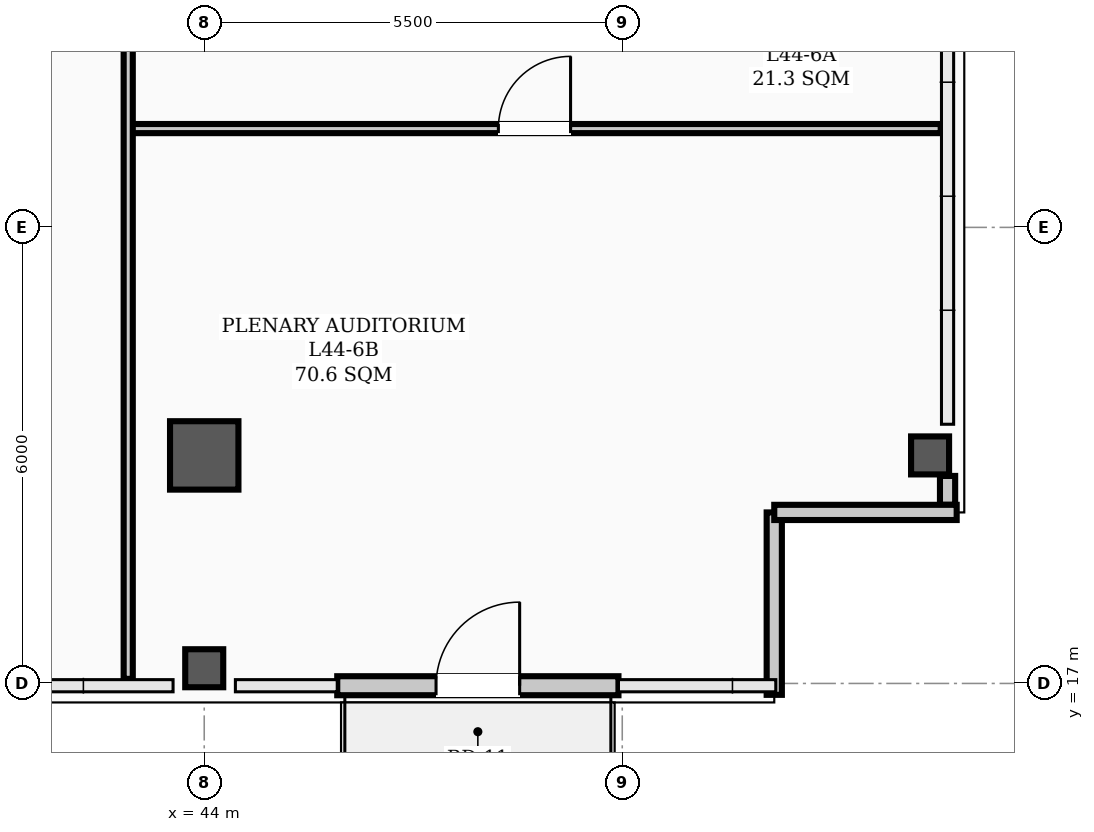
"""IFC4 building model, lengths in metres.
Left out: names, types, materials, properties, quantities, classifications, styles, units other than length and angle.
Written with IfcOpenShell. Run it as: python <this file> out.ifc"""

import sys

from ifc_helpers import new_model, si_unit, direction, frame, frame_2d, origin, origin_2d, place, context, subcontext, project, spatial, rectangle, hollow_rectangle, extrude, element, fill, save


model = new_model("IFC4")
c1 = context("Model", 3, precision=1e-05, world=origin(), true_north=direction((0.0, 1.0)))
c2 = subcontext(c1, "Body", "Model", "MODEL_VIEW")
j1 = project(units=[si_unit("LENGTHUNIT", "METRE"), si_unit("PLANEANGLEUNIT", "RADIAN")], contexts=[c1])
p1 = place(None, origin())
s1 = spatial("IfcSite", under=j1, at=p1, CompositionType="ELEMENT")
p2 = place(p1, origin())
s2 = spatial("IfcBuilding", under=s1, at=p2, CompositionType="ELEMENT")
p3 = place(p2, frame((0.0, 0.0, 177.3)))
s3 = spatial("IfcBuildingStorey", under=s2, at=p3, CompositionType="ELEMENT", Elevation=177.3)
p4 = place(p3, frame((44.0, 20.0, 0.0), z_axis=(0.0, 0.0, 1.0), x_axis=(1.0, 0.0, 0.0)))
e1 = element("IfcColumn", 1, at=p4, inside=s3, PredefinedType="COLUMN", context=c2, shape_type="SweptSolid", body=[
    extrude(hollow_rectangle(XDim=0.9, YDim=0.9, WallThickness=0.035, InnerFilletRadius=0.017, OuterFilletRadius=0.052, at=origin_2d()), origin(), (0.0, 0.0, 1.0), 3.9),
])
for number, where, z_axis, x_axis in (
    (2, (44.0, 17.2, 0.0), (0.0, 0.0, 1.0), (1.0, 0.0, 0.0)),
    (3, (53.55, 20.0, 0.0), (0.0, 0.0, 1.0), (1.0, 0.0, 0.0)),
):
    element("IfcColumn", number, at=place(p3, frame(where, z_axis=z_axis, x_axis=x_axis)), inside=s3, PredefinedType="COLUMN", context=c2, shape_type="SweptSolid", body=[
        extrude(hollow_rectangle(XDim=0.5, YDim=0.5, WallThickness=0.024, InnerFilletRadius=0.012, OuterFilletRadius=0.036, at=origin_2d()), origin(), (0.0, 0.0, 1.0), 3.9),
    ])
p5 = place(p3, frame((53.78, 19.35, 0.0), z_axis=(0.0, 0.0, 1.0), x_axis=(0.0, 1.0, 0.0)))
e4 = element("IfcWall", 4, at=p5, inside=s3, PredefinedType="PARAPET", context=c2, shape_type="SweptSolid", body=[
    extrude(rectangle(XDim=0.38, YDim=0.2, at=frame_2d((0.19, 0.0))), origin(), (0.0, 0.0, 1.0), 1.2),
])
for number, where, z_axis, x_axis in (
    (5, (51.5, 16.85, 0.0), (0.0, 0.0, 1.0), (0.0, 1.0, 0.0)),
    (6, (51.5, 19.25, 0.0), (0.0, 0.0, 1.0), (1.0, 0.0, 0.0)),
):
    element("IfcWall", number, at=place(p3, frame(where, z_axis=z_axis, x_axis=x_axis)), inside=s3, PredefinedType="PARAPET", context=c2, shape_type="SweptSolid", body=[
        extrude(rectangle(XDim=2.4, YDim=0.2, at=frame_2d((1.2, 0.0))), origin(), (0.0, 0.0, 1.0), 1.2),
    ])
p6 = place(p3, frame((45.75, 16.97, 0.0), z_axis=(0.0, 0.0, 1.0), x_axis=(1.0, 0.0, 0.0)))
e7 = element("IfcWall", 7, at=p6, inside=s3, PredefinedType="STANDARD", context=c2, shape_type="SweptSolid", body=[
    extrude(rectangle(XDim=3.7, YDim=0.25, at=frame_2d((1.85, 0.0))), origin(), (0.0, 0.0, 1.0), 3.18),
])
p7 = place(p6, frame((1.3, 0.0, 0.0)))
e8 = element("IfcOpeningElement", 8, at=p7, cuts=e7, PredefinedType="OPENING", context=c2, shape_type="SweptSolid", body=[
    extrude(rectangle(XDim=1.1, YDim=2.2, at=frame_2d((0.55, 1.1))), frame((0.0, 0.135, 0.0), z_axis=(0.0, -1.0, 0.0), x_axis=(1.0, 0.0, 0.0)), (0.0, 0.0, 1.0), 0.27),
])
p8 = place(p3, frame((43.0, 24.3, 0.0), z_axis=(0.0, 0.0, 1.0), x_axis=(1.0, 0.0, 0.0)))
e9 = element("IfcWall", 9, at=p8, inside=s3, PredefinedType="PARTITIONING", context=c2, shape_type="SweptSolid", body=[
    extrude(rectangle(XDim=10.69, YDim=0.12, at=frame_2d((5.345, 0.0))), origin(), (0.0, 0.0, 1.0), 3.2),
])
p9 = place(p8, frame((4.87, 0.0, 0.0)))
e10 = element("IfcOpeningElement", 10, at=p9, cuts=e9, PredefinedType="OPENING", context=c2, shape_type="SweptSolid", body=[
    extrude(rectangle(XDim=0.95, YDim=2.08, at=frame_2d((0.475, 1.04))), frame((0.0, 0.07, 0.0), z_axis=(0.0, -1.0, 0.0), x_axis=(1.0, 0.0, 0.0)), (0.0, 0.0, 1.0), 0.14),
])
p10 = place(p3, frame((43.0, 17.06, 0.0), z_axis=(0.0, 0.0, 1.0), x_axis=(0.0, 1.0, 0.0)))
e11 = element("IfcWall", 11, at=p10, inside=s3, PredefinedType="PARTITIONING", context=c2, shape_type="SweptSolid", body=[
    extrude(rectangle(XDim=9.155, YDim=0.12, at=frame_2d((4.578, 0.0))), origin(), (0.0, 0.0, 1.0), 3.1),
])
p11 = place(p7, origin())
e12 = element("IfcDoor", 12, at=p11, inside=s3, OperationType="SINGLE_SWING_RIGHT", PredefinedType="DOOR", context=c2, shape_type="SweptSolid", body=[
    extrude(rectangle(XDim=1.1, YDim=2.2, at=frame_2d((0.55, 1.1))), frame((0.0, 0.025, 0.0), z_axis=(0.0, -1.0, 0.0), x_axis=(1.0, 0.0, 0.0)), (0.0, 0.0, 1.0), 0.05),
])
fill(e8, e12)
p12 = place(p9, origin())
e13 = element("IfcDoor", 13, at=p12, inside=s3, OperationType="SINGLE_SWING_RIGHT", PredefinedType="DOOR", context=c2, shape_type="SweptSolid", body=[
    extrude(rectangle(XDim=0.95, YDim=2.08, at=frame_2d((0.475, 1.04))), frame((0.0, 0.025, 0.0), z_axis=(0.0, -1.0, 0.0), x_axis=(1.0, 0.0, 0.0)), (0.0, 0.0, 1.0), 0.05),
])
fill(e10, e13)
save(model, sys.argv[1])
